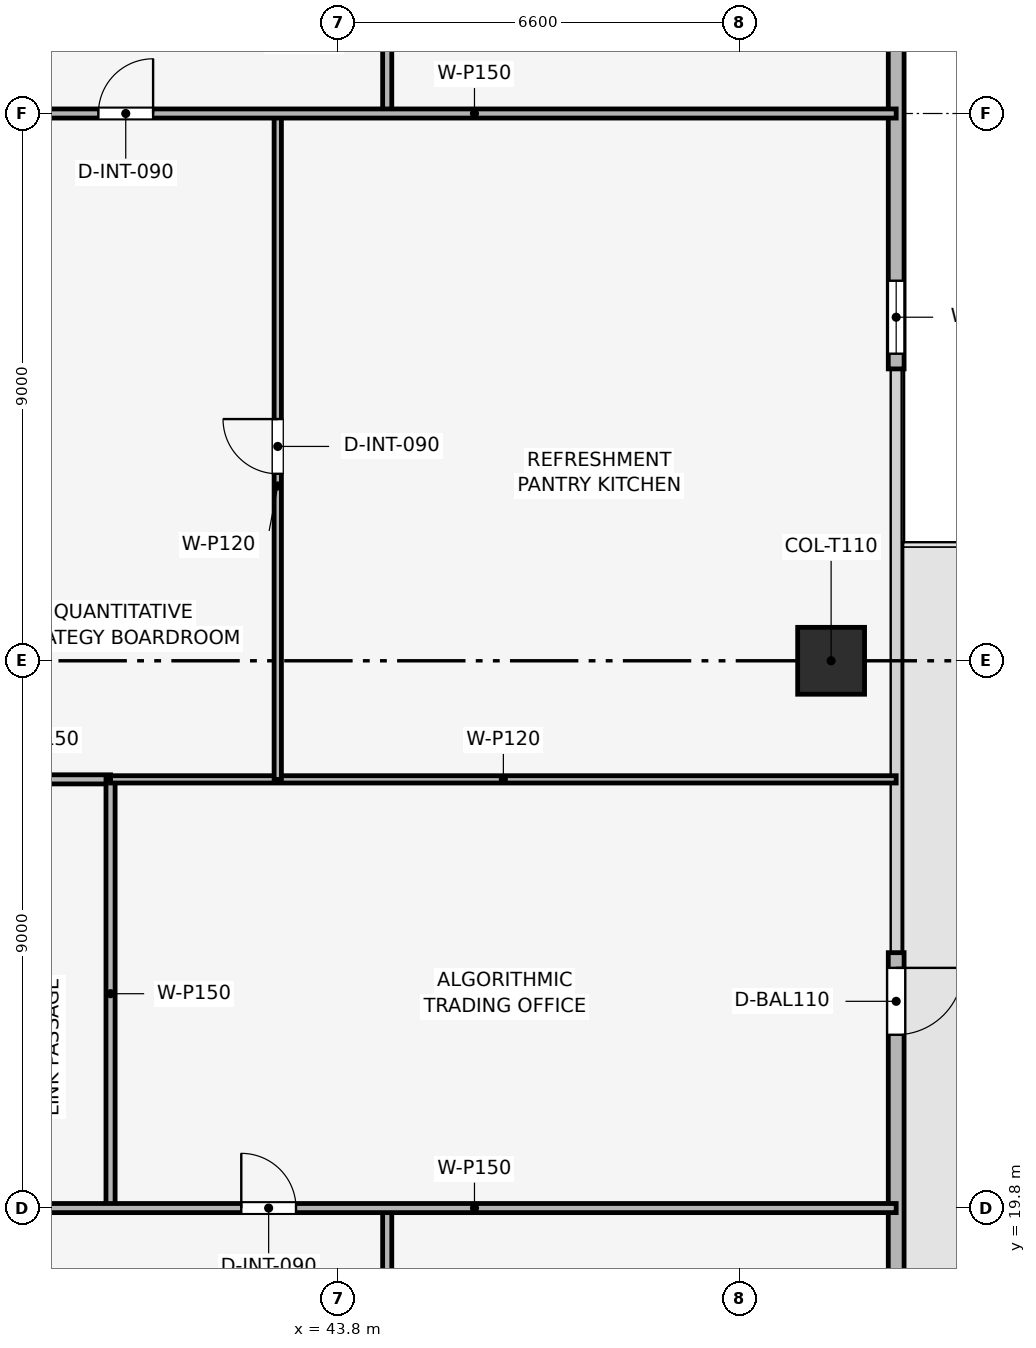
"""IFC4 building model, lengths in metres.
Left out: names, types, materials, properties, quantities, classifications, styles, units other than length and angle.
Written with IfcOpenShell. Run it as: python <this file> out.ifc"""

import sys

from ifc_helpers import new_model, si_unit, direction, frame, frame_2d, origin, origin_2d, place, context, subcontext, project, spatial, rectangle, extrude, element, fill, save


model = new_model("IFC4")
c1 = context("Model", 3, precision=1e-05, world=origin(), true_north=direction((0.0, 1.0)))
c2 = subcontext(c1, "Body", "Model", "MODEL_VIEW")
j1 = project(units=[si_unit("LENGTHUNIT", "METRE"), si_unit("PLANEANGLEUNIT", "RADIAN")], contexts=[c1])
p1 = place(None, origin())
s1 = spatial("IfcSite", under=j1, at=p1, CompositionType="ELEMENT")
p2 = place(p1, origin())
s2 = spatial("IfcBuilding", under=s1, at=p2, CompositionType="ELEMENT")
p3 = place(p2, frame((0.0, 0.0, 172.05)))
s3 = spatial("IfcBuildingStorey", under=s2, at=p3, CompositionType="ELEMENT", Elevation=172.05)
p4 = place(p3, frame((51.9, 28.8, 0.003), z_axis=(0.0, 0.0, 1.0), x_axis=(1.0, 0.0, 0.0)))
e1 = element("IfcColumn", 1, at=p4, inside=s3, PredefinedType="COLUMN", context=c2, shape_type="SweptSolid", body=[
    extrude(rectangle(XDim=1.1, YDim=1.1, at=origin_2d()), origin(), (0.0, 0.0, 1.0), 3.489),
])
p5 = place(p3, frame((52.97, 46.2, 0.0), z_axis=(0.0, 0.0, 1.0), x_axis=(0.0, -1.0, 0.0)))
e2 = element("IfcWall", 2, at=p5, inside=s3, PredefinedType="SOLIDWALL", context=c2, shape_type="SweptSolid", body=[
    extrude(rectangle(XDim=12.6, YDim=0.26, at=frame_2d((6.3, 0.0))), origin(), (0.0, 0.0, 1.0), 3.495),
])
p6 = place(p5, frame((11.15, 0.0, 0.9)))
e3 = element("IfcOpeningElement", 3, at=p6, cuts=e2, PredefinedType="OPENING", context=c2, shape_type="SweptSolid", body=[
    extrude(rectangle(XDim=1.2, YDim=2.1, at=frame_2d((0.6, 1.05))), frame((0.0, 0.14, 0.0), z_axis=(0.0, -1.0, 0.0), x_axis=(1.0, 0.0, 0.0)), (0.0, 0.0, 1.0), 0.28),
])
p7 = place(p3, frame((52.97, 24.0, 0.0), z_axis=(0.0, 0.0, 1.0), x_axis=(0.0, -1.0, 0.0)))
e4 = element("IfcWall", 4, at=p7, inside=s3, PredefinedType="SOLIDWALL", context=c2, shape_type="SweptSolid", body=[
    extrude(rectangle(XDim=12.6, YDim=0.26, at=frame_2d((6.3, 0.0))), origin(), (0.0, 0.0, 1.0), 3.495),
])
p8 = place(p7, frame((0.25, 0.0, 0.0)))
e5 = element("IfcOpeningElement", 5, at=p8, cuts=e4, PredefinedType="OPENING", context=c2, shape_type="SweptSolid", body=[
    extrude(rectangle(XDim=1.1, YDim=2.2, at=frame_2d((0.55, 1.1))), frame((0.0, 0.14, 0.0), z_axis=(0.0, -1.0, 0.0), x_axis=(1.0, 0.0, 0.0)), (0.0, 0.0, 1.0), 0.28),
])
p9 = place(p3, frame((37.8, 26.85, 0.0), z_axis=(0.0, 0.0, 1.0), x_axis=(1.0, 0.0, 0.0)))
e6 = element("IfcWall", 6, at=p9, inside=s3, PredefinedType="PARTITIONING", context=c2, shape_type="SweptSolid", body=[
    extrude(rectangle(XDim=2.25, YDim=0.15, at=frame_2d((1.125, 0.0))), origin(), (0.0, 0.0, 1.0), 3.495),
])
p10 = place(p3, frame((40.05, 19.8, 0.0), z_axis=(0.0, 0.0, 1.0), x_axis=(0.0, 1.0, 0.0)))
e7 = element("IfcWall", 7, at=p10, inside=s3, PredefinedType="PARTITIONING", context=c2, shape_type="SweptSolid", body=[
    extrude(rectangle(XDim=7.05, YDim=0.15, at=frame_2d((3.525, 0.0))), origin(), (0.0, 0.0, 1.0), 3.03),
])
p11 = place(p3, frame((40.05, 26.85, 0.0), z_axis=(0.0, 0.0, 1.0), x_axis=(1.0, 0.0, 0.0)))
e8 = element("IfcWall", 8, at=p11, inside=s3, PredefinedType="PARTITIONING", context=c2, shape_type="SweptSolid", body=[
    extrude(rectangle(XDim=12.92, YDim=0.12, at=frame_2d((6.46, 0.0))), origin(), (0.0, 0.0, 1.0), 2.98),
])
p12 = place(p3, frame((42.8, 26.85, 0.0), z_axis=(0.0, 0.0, 1.0), x_axis=(0.0, 1.0, 0.0)))
e9 = element("IfcWall", 9, at=p12, inside=s3, PredefinedType="PARTITIONING", context=c2, shape_type="SweptSolid", body=[
    extrude(rectangle(XDim=10.95, YDim=0.12, at=frame_2d((5.475, 0.0))), origin(), (0.0, 0.0, 1.0), 3.03),
])
p13 = place(p12, frame((5.025, 0.0, 0.0)))
e10 = element("IfcOpeningElement", 10, at=p13, cuts=e9, PredefinedType="OPENING", context=c2, shape_type="SweptSolid", body=[
    extrude(rectangle(XDim=0.9, YDim=2.1, at=frame_2d((0.45, 1.05))), frame((0.0, 0.07, 0.0), z_axis=(0.0, -1.0, 0.0), x_axis=(1.0, 0.0, 0.0)), (0.0, 0.0, 1.0), 0.14),
])
p14 = place(p3, frame((44.6, 17.4, 0.0), z_axis=(0.0, 0.0, 1.0), x_axis=(0.0, 1.0, 0.0)))
e11 = element("IfcWall", 11, at=p14, inside=s3, PredefinedType="PARTITIONING", context=c2, shape_type="SweptSolid", body=[
    extrude(rectangle(XDim=2.4, YDim=0.15, at=frame_2d((1.2, 0.0))), origin(), (0.0, 0.0, 1.0), 3.495),
])
p15 = place(p3, frame((44.6, 37.8, 0.0), z_axis=(0.0, 0.0, 1.0), x_axis=(0.0, 1.0, 0.0)))
e12 = element("IfcWall", 12, at=p15, inside=s3, PredefinedType="PARTITIONING", context=c2, shape_type="SweptSolid", body=[
    extrude(rectangle(XDim=2.4, YDim=0.15, at=frame_2d((1.2, 0.0))), origin(), (0.0, 0.0, 1.0), 3.495),
])
p16 = place(p3, frame((37.8, 19.8, 0.0), z_axis=(0.0, 0.0, 1.0), x_axis=(1.0, 0.0, 0.0)))
e13 = element("IfcWall", 13, at=p16, inside=s3, PredefinedType="PARTITIONING", context=c2, shape_type="SweptSolid", body=[
    extrude(rectangle(XDim=15.17, YDim=0.15, at=frame_2d((7.585, 0.0))), origin(), (0.0, 0.0, 1.0), 2.98),
])
p17 = place(p16, frame((4.4, 0.0, 0.0)))
e14 = element("IfcOpeningElement", 14, at=p17, cuts=e13, PredefinedType="OPENING", context=c2, shape_type="SweptSolid", body=[
    extrude(rectangle(XDim=0.9, YDim=2.1, at=frame_2d((0.45, 1.05))), frame((0.0, 0.085, 0.0), z_axis=(0.0, -1.0, 0.0), x_axis=(1.0, 0.0, 0.0)), (0.0, 0.0, 1.0), 0.17),
])
p18 = place(p3, frame((37.8, 37.8, 0.0), z_axis=(0.0, 0.0, 1.0), x_axis=(1.0, 0.0, 0.0)))
e15 = element("IfcWall", 15, at=p18, inside=s3, PredefinedType="PARTITIONING", context=c2, shape_type="SweptSolid", body=[
    extrude(rectangle(XDim=15.17, YDim=0.15, at=frame_2d((7.585, 0.0))), origin(), (0.0, 0.0, 1.0), 2.98),
])
p19 = place(p18, frame((2.05, 0.0, 0.0)))
e16 = element("IfcOpeningElement", 16, at=p19, cuts=e15, PredefinedType="OPENING", context=c2, shape_type="SweptSolid", body=[
    extrude(rectangle(XDim=0.9, YDim=2.1, at=frame_2d((0.45, 1.05))), frame((0.0, 0.085, 0.0), z_axis=(0.0, -1.0, 0.0), x_axis=(1.0, 0.0, 0.0)), (0.0, 0.0, 1.0), 0.17),
])
p20 = place(p8, origin())
e17 = element("IfcDoor", 17, at=p20, inside=s3, OperationType="SINGLE_SWING_LEFT", PredefinedType="DOOR", context=c2, shape_type="SweptSolid", body=[
    extrude(rectangle(XDim=1.1, YDim=2.2, at=frame_2d((0.55, 1.1))), frame((0.0, 0.025, 0.0), z_axis=(0.0, -1.0, 0.0), x_axis=(1.0, 0.0, 0.0)), (0.0, 0.0, 1.0), 0.05),
])
fill(e5, e17)
p21 = place(p6, origin())
e18 = element("IfcWindow", 18, at=p21, inside=s3, PartitioningType="SINGLE_PANEL", PredefinedType="WINDOW", context=c2, shape_type="SweptSolid", body=[
    extrude(rectangle(XDim=1.2, YDim=2.1, at=frame_2d((0.6, 1.05))), frame((0.0, 0.03, 0.0), z_axis=(0.0, -1.0, 0.0), x_axis=(1.0, 0.0, 0.0)), (0.0, 0.0, 1.0), 0.06),
])
fill(e3, e18)
p22 = place(p13, origin())
e19 = element("IfcDoor", 19, at=p22, inside=s3, OperationType="SINGLE_SWING_RIGHT", PredefinedType="DOOR", context=c2, shape_type="SweptSolid", body=[
    extrude(rectangle(XDim=0.9, YDim=2.1, at=frame_2d((0.45, 1.05))), frame((0.0, 0.025, 0.0), z_axis=(0.0, -1.0, 0.0), x_axis=(1.0, 0.0, 0.0)), (0.0, 0.0, 1.0), 0.05),
])
fill(e10, e19)
p23 = place(p17, origin())
e20 = element("IfcDoor", 20, at=p23, inside=s3, OperationType="SINGLE_SWING_LEFT", PredefinedType="DOOR", context=c2, shape_type="SweptSolid", body=[
    extrude(rectangle(XDim=0.9, YDim=2.1, at=frame_2d((0.45, 1.05))), frame((0.0, 0.025, 0.0), z_axis=(0.0, -1.0, 0.0), x_axis=(1.0, 0.0, 0.0)), (0.0, 0.0, 1.0), 0.05),
])
fill(e14, e20)
p24 = place(p19, origin())
e21 = element("IfcDoor", 21, at=p24, inside=s3, OperationType="SINGLE_SWING_RIGHT", PredefinedType="DOOR", context=c2, shape_type="SweptSolid", body=[
    extrude(rectangle(XDim=0.9, YDim=2.1, at=frame_2d((0.45, 1.05))), frame((0.0, 0.025, 0.0), z_axis=(0.0, -1.0, 0.0), x_axis=(1.0, 0.0, 0.0)), (0.0, 0.0, 1.0), 0.05),
])
fill(e16, e21)
save(model, sys.argv[1])
